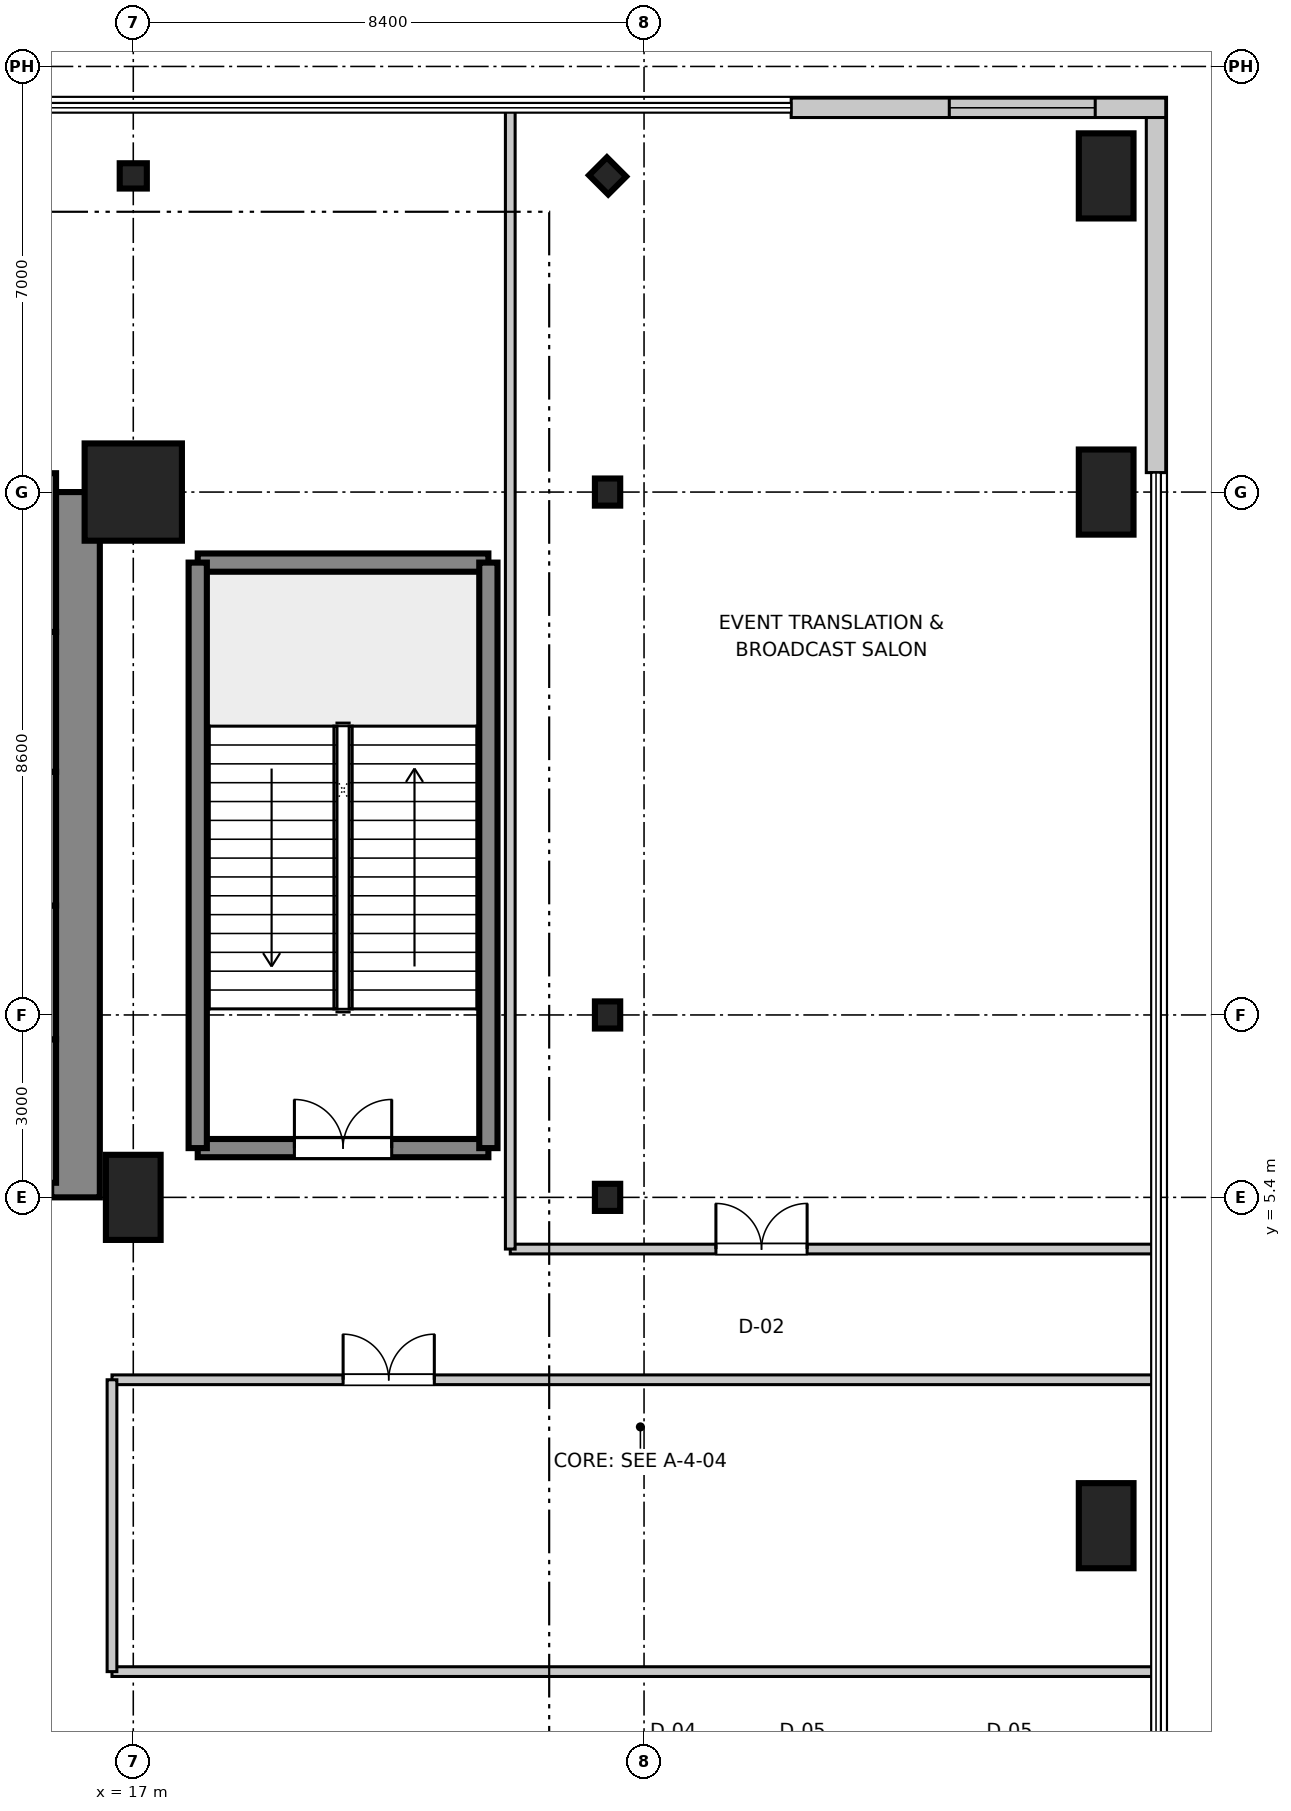
"""IFC4 building model, lengths in metres.
Left out: names, types, materials, properties, quantities, classifications, styles, units other than length and angle.
Written with IfcOpenShell. Run it as: python <this file> out.ifc"""

import sys

from ifc_helpers import new_model, si_unit, direction, frame, frame_2d, origin, origin_2d, place, context, subcontext, project, spatial, rectangle, i_section, extrude, source, transform, mapped, element, fill, save


model = new_model("IFC4")
c1 = context("Model", 3, precision=1e-05, world=origin(), true_north=direction((0.0, 1.0)))
c2 = subcontext(c1, "Body", "Model", "MODEL_VIEW")
j1 = project(units=[si_unit("LENGTHUNIT", "METRE"), si_unit("PLANEANGLEUNIT", "RADIAN")], contexts=[c1])
p1 = place(None, origin())
s1 = spatial("IfcSite", under=j1, at=p1, CompositionType="ELEMENT")
p2 = place(p1, origin())
s2 = spatial("IfcBuilding", under=s1, at=p2, CompositionType="ELEMENT")
p3 = place(p2, frame((0.0, 0.0, 21.6)))
s3 = spatial("IfcBuildingStorey", under=s2, at=p3, CompositionType="ELEMENT", Elevation=21.6)
m1 = source(origin(), c2, "Body", "SweptSolid", [
    extrude(rectangle(XDim=0.9, YDim=1.4, at=origin_2d()), origin(), (0.0, 0.0, 1.0), 5.355),
])
p4 = place(p3, frame((17.0, 5.4, 0.0), z_axis=(0.0, 0.0, 1.0), x_axis=(1.0, 0.0, 0.0)))
e1 = element("IfcColumn", 1, at=p4, inside=s3, PredefinedType="PILASTER", context=c2, shape_type="MappedRepresentation", body=[
    mapped(m1, transform((0.0, 0.0, 0.0), scale=1.0)),
])
m2 = source(origin(), c2, "Body", "SweptSolid", [
    extrude(rectangle(XDim=1.6, YDim=1.6, at=origin_2d()), origin(), (0.0, 0.0, 1.0), 5.355),
])
p5 = place(p3, frame((17.0, 17.0, 0.0), z_axis=(0.0, 0.0, 1.0), x_axis=(1.0, 0.0, 0.0)))
e2 = element("IfcColumn", 2, at=p5, inside=s3, PredefinedType="COLUMN", context=c2, shape_type="MappedRepresentation", body=[
    mapped(m2, transform((0.0, 0.0, 0.0), scale=1.0)),
])
for number, where, z_axis, x_axis in (
    (3, (33.0, 0.0, 0.0), (0.0, 0.0, 1.0), (1.0, 0.0, 0.0)),
    (4, (33.0, 17.0, 0.0), (0.0, 0.0, 1.0), (1.0, 0.0, 0.0)),
    (5, (33.0, 22.2, 0.0), (0.0, 0.0, 1.0), (1.0, 0.0, 0.0)),
):
    element("IfcColumn", number, at=place(p3, frame(where, z_axis=z_axis, x_axis=x_axis)), inside=s3, PredefinedType="PILASTER", context=c2, shape_type="MappedRepresentation", body=[
        mapped(m1, transform((0.0, 0.0, 0.0), scale=1.0)),
    ])
m3 = source(origin(), c2, "Body", "SweptSolid", [
    extrude(i_section(OverallWidth=0.416, OverallDepth=0.446, WebThickness=0.025, FlangeThickness=0.04, at=origin_2d()), origin(), (0.0, 0.0, 1.0), 5.255),
])
for number, where, z_axis, x_axis in (
    (6, (24.8, 5.4, 0.0), (0.0, 0.0, 1.0), (1.0, 0.0, 0.0)),
    (7, (24.8, 8.4, 0.0), (0.0, 0.0, 1.0), (1.0, 0.0, 0.0)),
    (8, (24.8, 17.0, 0.0), (0.0, 0.0, 1.0), (1.0, 0.0, 0.0)),
    (9, (17.0, 22.2, 0.0), (0.0, 0.0, 1.0), (0.0, 1.0, 0.0)),
    (10, (24.8, 22.2, 0.0), (0.0, 0.0, 1.0), (0.707, 0.707, 0.0)),
):
    element("IfcColumn", number, at=place(p3, frame(where, z_axis=z_axis, x_axis=x_axis)), inside=s3, PredefinedType="COLUMN", context=c2, shape_type="MappedRepresentation", body=[
        mapped(m3, transform((0.0, 0.0, 0.0), scale=1.0)),
    ])
m4 = source(origin(), c2, "Body", "SweptSolid", [
    extrude(rectangle(XDim=11.6, YDim=0.8, at=frame_2d((5.8, 0.0))), origin(), (0.0, 0.0, 1.0), 4.98),
])
p6 = place(p3, frame((16.05, 5.4, 0.0), z_axis=(0.0, 0.0, 1.0), x_axis=(0.0, 1.0, 0.0)))
e11 = element("IfcWall", 11, at=p6, inside=s3, PredefinedType="SHEAR", context=c2, shape_type="MappedRepresentation", body=[
    mapped(m4, transform((0.0, 0.0, 0.0), scale=1.0)),
])
m5 = source(origin(), c2, "Body", "SweptSolid", [
    extrude(rectangle(XDim=4.78, YDim=0.3, at=frame_2d((2.39, 0.0))), origin(), (0.0, 0.0, 1.0), 4.98),
])
p7 = place(p3, frame((18.06, 6.21, 0.0), z_axis=(0.0, 0.0, 1.0), x_axis=(1.0, 0.0, 0.0)))
e12 = element("IfcWall", 12, at=p7, inside=s3, PredefinedType="SHEAR", context=c2, shape_type="MappedRepresentation", body=[
    mapped(m5, transform((0.0, 0.0, 0.0), scale=1.0)),
])
p8 = place(p7, frame((1.59, 0.0, 0.0)))
e13 = element("IfcOpeningElement", 13, at=p8, cuts=e12, PredefinedType="OPENING", context=c2, shape_type="SweptSolid", body=[
    extrude(rectangle(XDim=1.6, YDim=2.2, at=frame_2d((0.8, 1.1))), frame((0.0, 0.16, 0.0), z_axis=(0.0, -1.0, 0.0), x_axis=(1.0, 0.0, 0.0)), (0.0, 0.0, 1.0), 0.32),
])
p9 = place(p3, frame((18.06, 15.84, 0.0), z_axis=(0.0, 0.0, 1.0), x_axis=(1.0, 0.0, 0.0)))
e14 = element("IfcWall", 14, at=p9, inside=s3, PredefinedType="SHEAR", context=c2, shape_type="MappedRepresentation", body=[
    mapped(m5, transform((0.0, 0.0, 0.0), scale=1.0)),
])
m6 = source(origin(), c2, "Body", "SweptSolid", [
    extrude(rectangle(XDim=9.63, YDim=0.3, at=frame_2d((4.815, 0.0))), origin(), (0.0, 0.0, 1.0), 4.98),
])
for number, where, z_axis, x_axis in (
    (15, (18.06, 6.21, 0.0), (0.0, 0.0, 1.0), (0.0, 1.0, 0.0)),
    (16, (22.84, 6.21, 0.0), (0.0, 0.0, 1.0), (0.0, 1.0, 0.0)),
):
    element("IfcWall", number, at=place(p3, frame(where, z_axis=z_axis, x_axis=x_axis)), inside=s3, PredefinedType="SHEAR", context=c2, shape_type="MappedRepresentation", body=[
        mapped(m6, transform((0.0, 0.0, 0.0), scale=1.0)),
    ])
m7 = source(origin(), c2, "Body", "SweptSolid", [
    extrude(rectangle(XDim=2.36, YDim=0.22, at=frame_2d((1.18, 0.0))), origin(), (0.0, 0.0, 1.0), 4.98),
])
p10 = place(p3, frame((15.62, 5.64, 0.0), z_axis=(0.0, 0.0, 1.0), x_axis=(0.0, 1.0, 0.0)))
e17 = element("IfcWall", 17, at=p10, inside=s3, PredefinedType="SHEAR", context=c2, shape_type="MappedRepresentation", body=[
    mapped(m7, transform((0.0, 0.0, 0.0), scale=1.0)),
])
m8 = source(origin(), c2, "Body", "SweptSolid", [
    extrude(rectangle(XDim=2.2, YDim=0.22, at=frame_2d((1.1, 0.0))), origin(), (0.0, 0.0, 1.0), 4.98),
])
for number, where, z_axis, x_axis in (
    (18, (15.62, 8.0, 0.0), (0.0, 0.0, 1.0), (0.0, 1.0, 0.0)),
    (19, (15.62, 10.2, 0.0), (0.0, 0.0, 1.0), (0.0, 1.0, 0.0)),
):
    element("IfcWall", number, at=place(p3, frame(where, z_axis=z_axis, x_axis=x_axis)), inside=s3, PredefinedType="SHEAR", context=c2, shape_type="MappedRepresentation", body=[
        mapped(m8, transform((0.0, 0.0, 0.0), scale=1.0)),
    ])
m9 = source(origin(), c2, "Body", "SweptSolid", [
    extrude(rectangle(XDim=2.3, YDim=0.22, at=frame_2d((1.15, 0.0))), origin(), (0.0, 0.0, 1.0), 4.98),
])
p11 = place(p3, frame((15.62, 12.4, 0.0), z_axis=(0.0, 0.0, 1.0), x_axis=(0.0, 1.0, 0.0)))
e20 = element("IfcWall", 20, at=p11, inside=s3, PredefinedType="SHEAR", context=c2, shape_type="MappedRepresentation", body=[
    mapped(m9, transform((0.0, 0.0, 0.0), scale=1.0)),
])
m10 = source(origin(), c2, "Body", "SweptSolid", [
    extrude(rectangle(XDim=2.61, YDim=0.22, at=frame_2d((1.305, 0.0))), origin(), (0.0, 0.0, 1.0), 4.98),
])
p12 = place(p3, frame((15.62, 14.7, 0.0), z_axis=(0.0, 0.0, 1.0), x_axis=(0.0, 1.0, 0.0)))
e21 = element("IfcWall", 21, at=p12, inside=s3, PredefinedType="SHEAR", context=c2, shape_type="MappedRepresentation", body=[
    mapped(m10, transform((0.0, 0.0, 0.0), scale=1.0)),
])
m11 = source(origin(), c2, "Body", "SweptSolid", [
    extrude(rectangle(XDim=6.16, YDim=0.32, at=frame_2d((3.08, 0.0))), origin(), (0.0, 0.0, 1.0), 4.98),
])
p13 = place(p3, frame((27.82, 23.32, 0.0), z_axis=(0.0, 0.0, 1.0), x_axis=(1.0, 0.0, 0.0)))
e22 = element("IfcWall", 22, at=p13, inside=s3, PredefinedType="STANDARD", context=c2, shape_type="MappedRepresentation", body=[
    mapped(m11, transform((0.0, 0.0, 0.0), scale=1.0)),
])
p14 = place(p13, frame((2.6, 0.0, 0.9)))
e23 = element("IfcOpeningElement", 23, at=p14, cuts=e22, PredefinedType="OPENING", context=c2, shape_type="SweptSolid", body=[
    extrude(rectangle(XDim=2.4, YDim=2.2, at=frame_2d((1.2, 1.1))), frame((0.0, 0.17, 0.0), z_axis=(0.0, -1.0, 0.0), x_axis=(1.0, 0.0, 0.0)), (0.0, 0.0, 1.0), 0.34),
])
m12 = source(origin(), c2, "Body", "SweptSolid", [
    extrude(rectangle(XDim=5.84, YDim=0.32, at=frame_2d((2.92, 0.0))), origin(), (0.0, 0.0, 1.0), 4.98),
])
p15 = place(p3, frame((33.82, 17.32, 0.0), z_axis=(0.0, 0.0, 1.0), x_axis=(0.0, 1.0, 0.0)))
e24 = element("IfcWall", 24, at=p15, inside=s3, PredefinedType="STANDARD", context=c2, shape_type="MappedRepresentation", body=[
    mapped(m12, transform((0.0, 0.0, 0.0), scale=1.0)),
])
m13 = source(origin(), c2, "Body", "SweptSolid", [
    extrude(rectangle(XDim=17.11, YDim=0.16, at=frame_2d((8.555, 0.0))), origin(), (0.0, 0.0, 1.0), 3.1),
])
p16 = place(p3, frame((16.65, -2.4, 0.0), z_axis=(0.0, 0.0, 1.0), x_axis=(1.0, 0.0, 0.0)))
e25 = element("IfcWall", 25, at=p16, inside=s3, PredefinedType="PARTITIONING", context=c2, shape_type="MappedRepresentation", body=[
    mapped(m13, transform((0.0, 0.0, 0.0), scale=1.0)),
])
p17 = place(p3, frame((16.65, 2.4, 0.0), z_axis=(0.0, 0.0, 1.0), x_axis=(1.0, 0.0, 0.0)))
e26 = element("IfcWall", 26, at=p17, inside=s3, PredefinedType="PARTITIONING", context=c2, shape_type="MappedRepresentation", body=[
    mapped(m13, transform((0.0, 0.0, 0.0), scale=1.0)),
])
p18 = place(p17, frame((3.801, 0.0, 0.0)))
e27 = element("IfcOpeningElement", 27, at=p18, cuts=e26, PredefinedType="OPENING", context=c2, shape_type="SweptSolid", body=[
    extrude(rectangle(XDim=1.5, YDim=2.15, at=frame_2d((0.75, 1.075))), frame((0.0, 0.09, 0.0), z_axis=(0.0, -1.0, 0.0), x_axis=(1.0, 0.0, 0.0)), (0.0, 0.0, 1.0), 0.18),
])
m14 = source(origin(), c2, "Body", "SweptSolid", [
    extrude(rectangle(XDim=4.8, YDim=0.16, at=frame_2d((2.4, 0.0))), origin(), (0.0, 0.0, 1.0), 3.1),
])
p19 = place(p3, frame((16.65, -2.4, 0.0), z_axis=(0.0, 0.0, 1.0), x_axis=(0.0, 1.0, 0.0)))
e28 = element("IfcWall", 28, at=p19, inside=s3, PredefinedType="PARTITIONING", context=c2, shape_type="MappedRepresentation", body=[
    mapped(m14, transform((0.0, 0.0, 0.0), scale=1.0)),
])
m15 = source(origin(), c2, "Body", "SweptSolid", [
    extrude(rectangle(XDim=10.56, YDim=0.16, at=frame_2d((5.28, 0.0))), origin(), (0.0, 0.0, 1.0), 3.1),
])
p20 = place(p3, frame((23.2, 4.55, 0.0), z_axis=(0.0, 0.0, 1.0), x_axis=(1.0, 0.0, 0.0)))
e29 = element("IfcWall", 29, at=p20, inside=s3, PredefinedType="PARTITIONING", context=c2, shape_type="MappedRepresentation", body=[
    mapped(m15, transform((0.0, 0.0, 0.0), scale=1.0)),
])
p21 = place(p20, frame((3.382, 0.0, 0.0)))
e30 = element("IfcOpeningElement", 30, at=p21, cuts=e29, PredefinedType="OPENING", context=c2, shape_type="SweptSolid", body=[
    extrude(rectangle(XDim=1.5, YDim=2.15, at=frame_2d((0.75, 1.075))), frame((0.0, 0.09, 0.0), z_axis=(0.0, -1.0, 0.0), x_axis=(1.0, 0.0, 0.0)), (0.0, 0.0, 1.0), 0.18),
])
m16 = source(origin(), c2, "Body", "SweptSolid", [
    extrude(rectangle(XDim=18.71, YDim=0.16, at=frame_2d((9.355, 0.0))), origin(), (0.0, 0.0, 1.0), 3.1),
])
p22 = place(p3, frame((23.2, 4.55, 0.0), z_axis=(0.0, 0.0, 1.0), x_axis=(0.0, 1.0, 0.0)))
e31 = element("IfcWall", 31, at=p22, inside=s3, PredefinedType="PARTITIONING", context=c2, shape_type="MappedRepresentation", body=[
    mapped(m16, transform((0.0, 0.0, 0.0), scale=1.0)),
])
m17 = source(origin(), c2, "Body", "SweptSolid", [
    extrude(rectangle(XDim=1.6, YDim=2.2, at=frame_2d((0.8, 1.1))), frame((0.0, 0.025, 0.0), z_axis=(0.0, -1.0, 0.0), x_axis=(1.0, 0.0, 0.0)), (0.0, 0.0, 1.0), 0.05),
])
p23 = place(p8, origin())
e32 = element("IfcDoor", 32, at=p23, inside=s3, OperationType="DOUBLE_DOOR_SINGLE_SWING", PredefinedType="DOOR", context=c2, shape_type="MappedRepresentation", body=[
    mapped(m17, transform((0.0, 0.0, 0.0), scale=1.0)),
])
fill(e13, e32)
m18 = source(origin(), c2, "Body", "SweptSolid", [
    extrude(rectangle(XDim=2.4, YDim=2.2, at=frame_2d((1.2, 1.1))), frame((0.0, 0.03, 0.0), z_axis=(0.0, -1.0, 0.0), x_axis=(1.0, 0.0, 0.0)), (0.0, 0.0, 1.0), 0.06),
])
p24 = place(p14, origin())
e33 = element("IfcWindow", 33, at=p24, inside=s3, PartitioningType="SINGLE_PANEL", PredefinedType="WINDOW", context=c2, shape_type="MappedRepresentation", body=[
    mapped(m18, transform((0.0, 0.0, 0.0), scale=1.0)),
])
fill(e23, e33)
m19 = source(origin(), c2, "Body", "SweptSolid", [
    extrude(rectangle(XDim=1.5, YDim=2.15, at=frame_2d((0.75, 1.075))), frame((0.0, 0.025, 0.0), z_axis=(0.0, -1.0, 0.0), x_axis=(1.0, 0.0, 0.0)), (0.0, 0.0, 1.0), 0.05),
])
p25 = place(p18, frame((1.5, 0.0, 0.0), z_axis=(0.0, 0.0, 1.0), x_axis=(-1.0, 0.0, 0.0)))
e34 = element("IfcDoor", 34, at=p25, inside=s3, OperationType="DOUBLE_DOOR_SINGLE_SWING", PredefinedType="DOOR", context=c2, shape_type="MappedRepresentation", body=[
    mapped(m19, transform((0.0, 0.0, 0.0), scale=1.0)),
])
fill(e27, e34)
p26 = place(p21, origin())
e35 = element("IfcDoor", 35, at=p26, inside=s3, OperationType="DOUBLE_DOOR_SINGLE_SWING", PredefinedType="DOOR", context=c2, shape_type="MappedRepresentation", body=[
    mapped(m19, transform((0.0, 0.0, 0.0), scale=1.0)),
])
fill(e30, e35)
save(model, sys.argv[1])
